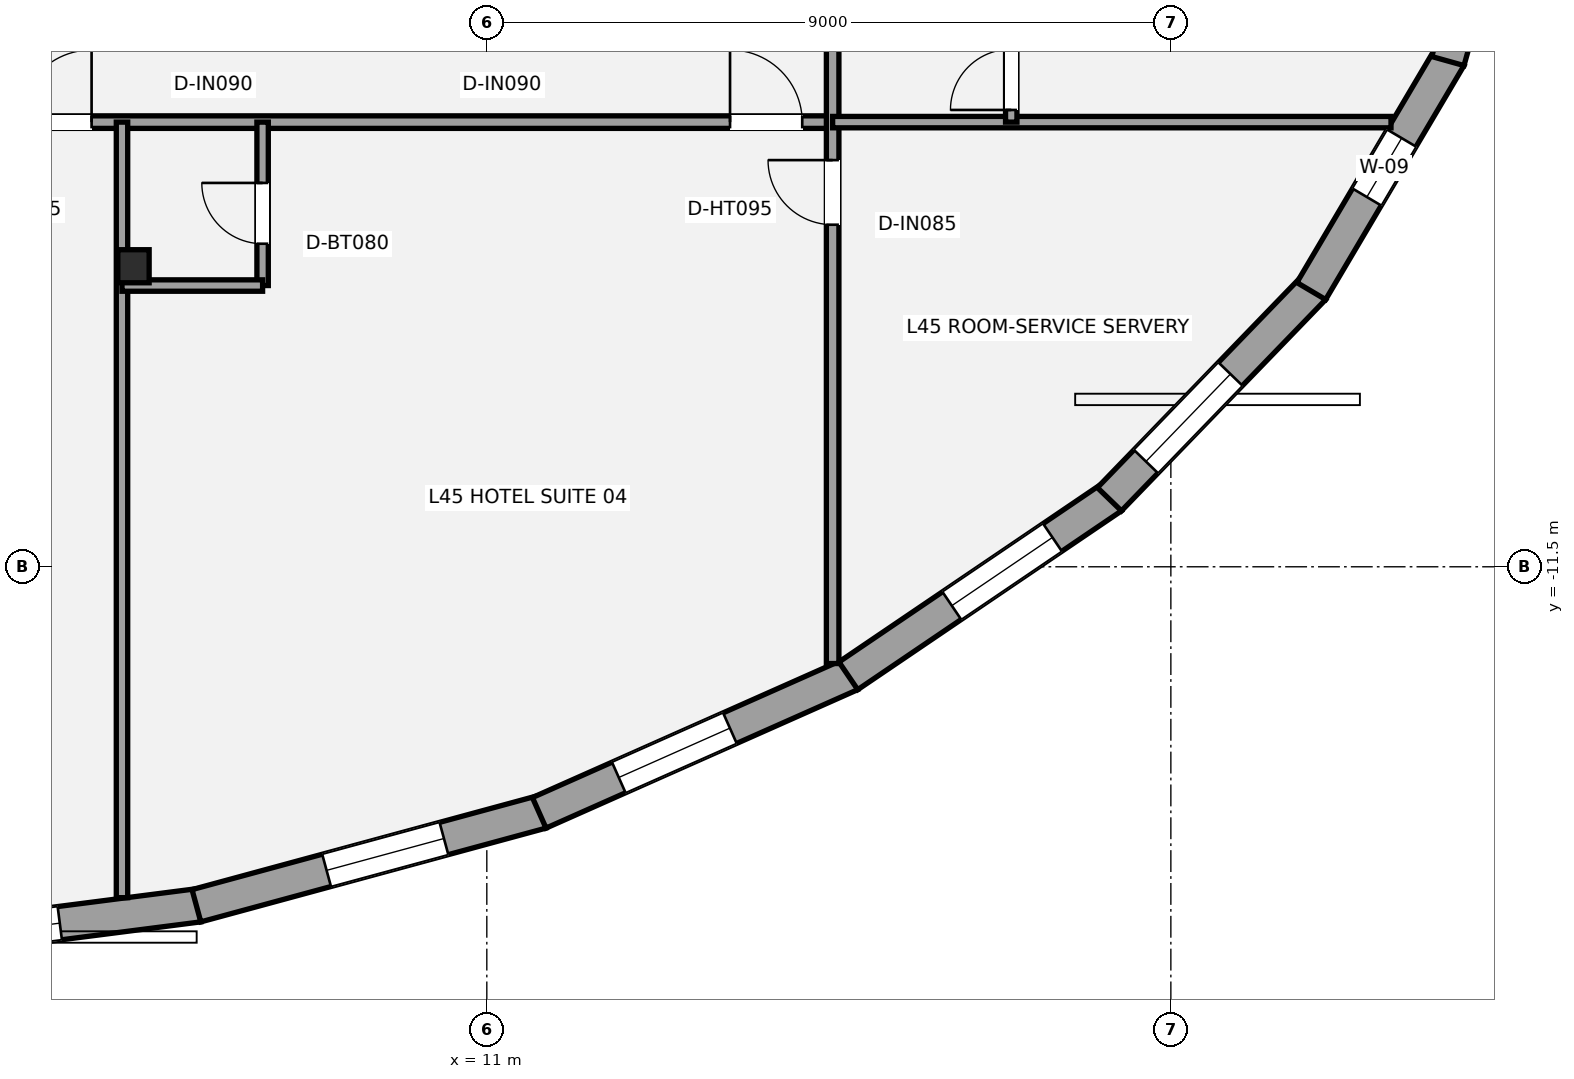
"""IFC4 building model, lengths in metres.
Left out: names, types, materials, properties, quantities, classifications, styles, units other than length and angle.
Written with IfcOpenShell. Run it as: python <this file> out.ifc"""

import sys

from ifc_helpers import new_model, si_unit, direction, frame, frame_2d, origin, origin_2d, place, context, subcontext, project, spatial, rectangle, i_section, extrude, element, fill, save


model = new_model("IFC4")
c1 = context("Model", 3, precision=1e-05, world=origin(), true_north=direction((0.0, 1.0)))
c2 = subcontext(c1, "Body", "Model", "MODEL_VIEW")
j1 = project(units=[si_unit("LENGTHUNIT", "METRE"), si_unit("PLANEANGLEUNIT", "RADIAN")], contexts=[c1])
p1 = place(None, origin())
s1 = spatial("IfcSite", under=j1, at=p1, CompositionType="ELEMENT")
p2 = place(p1, origin())
s2 = spatial("IfcBuilding", under=s1, at=p2, CompositionType="ELEMENT")
p3 = place(p2, frame((0.0, 0.0, 166.2)))
s3 = spatial("IfcBuildingStorey", under=s2, at=p3, CompositionType="ELEMENT", Elevation=166.2)
p4 = place(p3, frame((6.351, -7.546, 0.0), z_axis=(0.0, 0.0, 1.0), x_axis=(1.0, 0.0, 0.0)))
e1 = element("IfcColumn", 1, at=p4, inside=s3, PredefinedType="COLUMN", context=c2, shape_type="SweptSolid", body=[
    extrude(i_section(OverallWidth=0.412, OverallDepth=0.435, WebThickness=0.036, FlangeThickness=0.057, at=origin_2d()), origin(), (0.0, 0.0, 1.0), 3.2),
])
p5 = place(p3, frame((7.209, -15.954, 0.0), z_axis=(0.0, 0.0, 1.0), x_axis=(-0.991852910824, -0.127388395426, 0.0)))
e2 = element("IfcWall", 2, at=p5, inside=s3, PredefinedType="STANDARD", context=c2, shape_type="SweptSolid", body=[
    extrude(rectangle(XDim=4.837, YDim=0.44, at=frame_2d((2.418, 0.0))), origin(), (0.0, 0.0, 1.0), 2.315),
])
p6 = place(p5, frame((1.843, 0.0, 0.58)))
e3 = element("IfcOpeningElement", 3, at=p6, cuts=e2, PredefinedType="OPENING", context=c2, shape_type="SweptSolid", body=[
    extrude(rectangle(XDim=1.6, YDim=1.55, at=frame_2d((0.8, 0.775))), frame((0.0, 0.23, 0.0), z_axis=(0.0, -1.0, 0.0), x_axis=(1.0, 0.0, 0.0)), (0.0, 0.0, 1.0), 0.46),
])
p7 = place(p3, frame((11.721, -14.726, 0.0), z_axis=(0.0, 0.0, 1.0), x_axis=(-0.965037424263, -0.262112132058, 0.0)))
e4 = element("IfcWall", 4, at=p7, inside=s3, PredefinedType="STANDARD", context=c2, shape_type="SweptSolid", body=[
    extrude(rectangle(XDim=4.707, YDim=0.44, at=frame_2d((2.353, 0.0))), origin(), (0.0, 0.0, 1.0), 2.315),
])
p8 = place(p7, frame((1.332, 0.0, 0.58)))
e5 = element("IfcOpeningElement", 5, at=p8, cuts=e4, PredefinedType="OPENING", context=c2, shape_type="SweptSolid", body=[
    extrude(rectangle(XDim=1.6, YDim=1.55, at=frame_2d((0.8, 0.775))), frame((0.0, 0.23, 0.0), z_axis=(0.0, -1.0, 0.0), x_axis=(1.0, 0.0, 0.0)), (0.0, 0.0, 1.0), 0.46),
])
p9 = place(p3, frame((15.791, -12.916, 0.0), z_axis=(0.0, 0.0, 1.0), x_axis=(-0.913907994914, -0.405921392431, 0.0)))
e6 = element("IfcWall", 6, at=p9, inside=s3, PredefinedType="STANDARD", context=c2, shape_type="SweptSolid", body=[
    extrude(rectangle(XDim=4.487, YDim=0.44, at=frame_2d((2.244, 0.0))), origin(), (0.0, 0.0, 1.0), 2.315),
])
p10 = place(p9, frame((1.742, 0.0, 0.58)))
e7 = element("IfcOpeningElement", 7, at=p10, cuts=e6, PredefinedType="OPENING", context=c2, shape_type="SweptSolid", body=[
    extrude(rectangle(XDim=1.6, YDim=1.55, at=frame_2d((0.8, 0.775))), frame((0.0, 0.23, 0.0), z_axis=(0.0, -1.0, 0.0), x_axis=(1.0, 0.0, 0.0)), (0.0, 0.0, 1.0), 0.46),
])
p11 = place(p3, frame((19.227, -10.583, 0.0), z_axis=(0.0, 0.0, 1.0), x_axis=(-0.827760762475, -0.561081206338, 0.0)))
e8 = element("IfcWall", 8, at=p11, inside=s3, PredefinedType="STANDARD", context=c2, shape_type="SweptSolid", body=[
    extrude(rectangle(XDim=4.192, YDim=0.44, at=frame_2d((2.096, 0.0))), origin(), (0.0, 0.0, 1.0), 2.315),
])
p12 = place(p11, frame((0.947, 0.0, 0.58)))
e9 = element("IfcOpeningElement", 9, at=p12, cuts=e8, PredefinedType="OPENING", context=c2, shape_type="SweptSolid", body=[
    extrude(rectangle(XDim=1.6, YDim=1.55, at=frame_2d((0.8, 0.775))), frame((0.0, 0.23, 0.0), z_axis=(0.0, -1.0, 0.0), x_axis=(1.0, 0.0, 0.0)), (0.0, 0.0, 1.0), 0.46),
])
p13 = place(p3, frame((21.879, -7.832, 0.0), z_axis=(0.0, 0.0, 1.0), x_axis=(-0.694975307772, -0.719033602544, 0.0)))
e10 = element("IfcWall", 10, at=p13, inside=s3, PredefinedType="STANDARD", context=c2, shape_type="SweptSolid", body=[
    extrude(rectangle(XDim=3.866, YDim=0.44, at=frame_2d((1.933, 0.0))), origin(), (0.0, 0.0, 1.0), 2.315),
])
p14 = place(p13, frame((1.575, 0.0, 0.58)))
e11 = element("IfcOpeningElement", 11, at=p14, cuts=e10, PredefinedType="OPENING", context=c2, shape_type="SweptSolid", body=[
    extrude(rectangle(XDim=1.6, YDim=1.55, at=frame_2d((0.8, 0.775))), frame((0.0, 0.23, 0.0), z_axis=(0.0, -1.0, 0.0), x_axis=(1.0, 0.0, 0.0)), (0.0, 0.0, 1.0), 0.46),
])
p15 = place(p3, frame((23.667, -4.794, 0.0), z_axis=(0.0, 0.0, 1.0), x_axis=(-0.508883387051, -0.860835465338, 0.0)))
e12 = element("IfcWall", 12, at=p15, inside=s3, PredefinedType="STANDARD", context=c2, shape_type="SweptSolid", body=[
    extrude(rectangle(XDim=3.577, YDim=0.44, at=frame_2d((1.788, 0.0))), origin(), (0.0, 0.0, 1.0), 2.315),
])
p16 = place(p15, frame((1.239, 0.0, 0.58)))
e13 = element("IfcOpeningElement", 13, at=p16, cuts=e12, PredefinedType="OPENING", context=c2, shape_type="SweptSolid", body=[
    extrude(rectangle(XDim=0.9, YDim=1.35, at=frame_2d((0.45, 0.675))), frame((0.0, 0.23, 0.0), z_axis=(0.0, -1.0, 0.0), x_axis=(1.0, 0.0, 0.0)), (0.0, 0.0, 1.0), 0.46),
])
p17 = place(p3, frame((24.554, -1.594, 0.0), z_axis=(0.0, 0.0, 1.0), x_axis=(-0.269235699479, -0.963074315993, 0.0)))
e14 = element("IfcWall", 14, at=p17, inside=s3, PredefinedType="STANDARD", context=c2, shape_type="SweptSolid", body=[
    extrude(rectangle(XDim=3.377, YDim=0.44, at=frame_2d((1.688, 0.0))), origin(), (0.0, 0.0, 1.0), 2.315),
])
p18 = place(p17, frame((1.429, 0.0, 0.58)))
e15 = element("IfcOpeningElement", 15, at=p18, cuts=e14, PredefinedType="OPENING", context=c2, shape_type="SweptSolid", body=[
    extrude(rectangle(XDim=1.6, YDim=1.55, at=frame_2d((0.8, 0.775))), frame((0.0, 0.23, 0.0), z_axis=(0.0, -1.0, 0.0), x_axis=(1.0, 0.0, 0.0)), (0.0, 0.0, 1.0), 0.46),
])
p19 = place(p3, frame((-15.95, -5.65, 0.0), z_axis=(0.0, 0.0, 1.0), x_axis=(1.0, 0.0, 0.0)))
e16 = element("IfcWall", 16, at=p19, inside=s3, PredefinedType="PARTITIONING", context=c2, shape_type="SweptSolid", body=[
    extrude(rectangle(XDim=31.5, YDim=0.165, at=frame_2d((15.75, 0.0))), origin(), (0.0, 0.0, 1.0), 2.398),
])
p20 = place(p19, frame((4.8, 0.0, 0.0)))
e17 = element("IfcOpeningElement", 17, at=p20, cuts=e16, PredefinedType="OPENING", context=c2, shape_type="SweptSolid", body=[
    extrude(rectangle(XDim=0.95, YDim=2.15, at=frame_2d((0.475, 1.075))), frame((0.0, 0.093, 0.0), z_axis=(0.0, -1.0, 0.0), x_axis=(1.0, 0.0, 0.0)), (0.0, 0.0, 1.0), 0.185),
])
p21 = place(p19, frame((12.8, 0.0, 0.0)))
e18 = element("IfcOpeningElement", 18, at=p21, cuts=e16, PredefinedType="OPENING", context=c2, shape_type="SweptSolid", body=[
    extrude(rectangle(XDim=0.95, YDim=2.15, at=frame_2d((0.475, 1.075))), frame((0.0, 0.093, 0.0), z_axis=(0.0, -1.0, 0.0), x_axis=(1.0, 0.0, 0.0)), (0.0, 0.0, 1.0), 0.185),
])
p22 = place(p19, frame((20.8, 0.0, 0.0)))
e19 = element("IfcOpeningElement", 19, at=p22, cuts=e16, PredefinedType="OPENING", context=c2, shape_type="SweptSolid", body=[
    extrude(rectangle(XDim=0.95, YDim=2.15, at=frame_2d((0.475, 1.075))), frame((0.0, 0.093, 0.0), z_axis=(0.0, -1.0, 0.0), x_axis=(1.0, 0.0, 0.0)), (0.0, 0.0, 1.0), 0.185),
])
p23 = place(p19, frame((30.15, 0.0, 0.0)))
e20 = element("IfcOpeningElement", 20, at=p23, cuts=e16, PredefinedType="OPENING", context=c2, shape_type="SweptSolid", body=[
    extrude(rectangle(XDim=0.95, YDim=2.15, at=frame_2d((0.475, 1.075))), frame((0.0, 0.093, 0.0), z_axis=(0.0, -1.0, 0.0), x_axis=(1.0, 0.0, 0.0)), (0.0, 0.0, 1.0), 0.185),
])
p24 = place(p3, frame((15.55, -12.773, 0.0), z_axis=(0.0, 0.0, 1.0), x_axis=(0.0, 1.0, 0.0)))
e21 = element("IfcWall", 21, at=p24, inside=s3, PredefinedType="PARTITIONING", context=c2, shape_type="SweptSolid", body=[
    extrude(rectangle(XDim=20.323, YDim=0.165, at=frame_2d((10.162, 0.0))), origin(), (0.0, 0.0, 1.0), 2.473),
])
p25 = place(p24, frame((5.773, 0.0, 0.0)))
e22 = element("IfcOpeningElement", 22, at=p25, cuts=e21, PredefinedType="OPENING", context=c2, shape_type="SweptSolid", body=[
    extrude(rectangle(XDim=0.85, YDim=2.1, at=frame_2d((0.425, 1.05))), frame((0.0, 0.093, 0.0), z_axis=(0.0, -1.0, 0.0), x_axis=(1.0, 0.0, 0.0)), (0.0, 0.0, 1.0), 0.185),
])
p26 = place(p24, frame((9.823, 0.0, 0.0)))
e23 = element("IfcOpeningElement", 23, at=p26, cuts=e21, PredefinedType="OPENING", context=c2, shape_type="SweptSolid", body=[
    extrude(rectangle(XDim=0.95, YDim=2.15, at=frame_2d((0.475, 1.075))), frame((0.0, 0.093, 0.0), z_axis=(0.0, -1.0, 0.0), x_axis=(1.0, 0.0, 0.0)), (0.0, 0.0, 1.0), 0.185),
])
p27 = place(p24, frame((14.223, 0.0, 0.0)))
e24 = element("IfcOpeningElement", 24, at=p27, cuts=e21, PredefinedType="OPENING", context=c2, shape_type="SweptSolid", body=[
    extrude(rectangle(XDim=0.95, YDim=2.15, at=frame_2d((0.475, 1.075))), frame((0.0, 0.093, 0.0), z_axis=(0.0, -1.0, 0.0), x_axis=(1.0, 0.0, 0.0)), (0.0, 0.0, 1.0), 0.185),
])
p28 = place(p24, frame((18.973, 0.0, 0.0)))
e25 = element("IfcOpeningElement", 25, at=p28, cuts=e21, PredefinedType="OPENING", context=c2, shape_type="SweptSolid", body=[
    extrude(rectangle(XDim=0.95, YDim=2.15, at=frame_2d((0.475, 1.075))), frame((0.0, 0.093, 0.0), z_axis=(0.0, -1.0, 0.0), x_axis=(1.0, 0.0, 0.0)), (0.0, 0.0, 1.0), 0.185),
])
p29 = place(p3, frame((15.55, -5.65, 0.0), z_axis=(0.0, 0.0, 1.0), x_axis=(1.0, 0.0, 0.0)))
e26 = element("IfcWall", 26, at=p29, inside=s3, PredefinedType="PLUMBINGWALL", context=c2, shape_type="SweptSolid", body=[
    extrude(rectangle(XDim=7.346, YDim=0.15, at=frame_2d((3.673, 0.0))), origin(), (0.0, 0.0, 1.0), 2.473),
])
p30 = place(p3, frame((6.2, -15.853, 0.0), z_axis=(0.0, 0.0, 1.0), x_axis=(0.0, 1.0, 0.0)))
e27 = element("IfcWall", 27, at=p30, inside=s3, PredefinedType="PLUMBINGWALL", context=c2, shape_type="SweptSolid", body=[
    extrude(rectangle(XDim=10.203, YDim=0.15, at=frame_2d((5.102, 0.0))), origin(), (0.0, 0.0, 1.0), 2.473),
])
p31 = place(p3, frame((8.05, -7.8, 0.0), z_axis=(0.0, 0.0, 1.0), x_axis=(0.0, 1.0, 0.0)))
e28 = element("IfcWall", 28, at=p31, inside=s3, PredefinedType="PLUMBINGWALL", context=c2, shape_type="SweptSolid", body=[
    extrude(rectangle(XDim=2.15, YDim=0.15, at=frame_2d((1.075, 0.0))), origin(), (0.0, 0.0, 1.0), 2.473),
])
p32 = place(p31, frame((0.55, 0.0, 0.0)))
e29 = element("IfcOpeningElement", 29, at=p32, cuts=e28, PredefinedType="OPENING", context=c2, shape_type="SweptSolid", body=[
    extrude(rectangle(XDim=0.8, YDim=2.1, at=frame_2d((0.4, 1.05))), frame((0.0, 0.085, 0.0), z_axis=(0.0, -1.0, 0.0), x_axis=(1.0, 0.0, 0.0)), (0.0, 0.0, 1.0), 0.17),
])
p33 = place(p3, frame((6.2, -7.8, 0.0), z_axis=(0.0, 0.0, 1.0), x_axis=(1.0, 0.0, 0.0)))
e30 = element("IfcWall", 30, at=p33, inside=s3, PredefinedType="PLUMBINGWALL", context=c2, shape_type="SweptSolid", body=[
    extrude(rectangle(XDim=1.85, YDim=0.15, at=frame_2d((0.925, 0.0))), origin(), (0.0, 0.0, 1.0), 2.473),
])
p34 = place(p3, frame((17.9, -5.65, 0.0), z_axis=(0.0, 0.0, 1.0), x_axis=(0.0, 1.0, 0.0)))
e31 = element("IfcWall", 31, at=p34, inside=s3, PredefinedType="PLUMBINGWALL", context=c2, shape_type="SweptSolid", body=[
    extrude(rectangle(XDim=2.15, YDim=0.15, at=frame_2d((1.075, 0.0))), origin(), (0.0, 0.0, 1.0), 3.02),
])
p35 = place(p34, frame((0.16, 0.0, 0.0)))
e32 = element("IfcOpeningElement", 32, at=p35, cuts=e31, PredefinedType="OPENING", context=c2, shape_type="SweptSolid", body=[
    extrude(rectangle(XDim=0.8, YDim=2.1, at=frame_2d((0.4, 1.05))), frame((0.0, 0.085, 0.0), z_axis=(0.0, -1.0, 0.0), x_axis=(1.0, 0.0, 0.0)), (0.0, 0.0, 1.0), 0.17),
])
p36 = place(p6, origin())
e33 = element("IfcWindow", 33, at=p36, inside=s3, PartitioningType="SINGLE_PANEL", PredefinedType="WINDOW", context=c2, shape_type="SweptSolid", body=[
    extrude(rectangle(XDim=1.6, YDim=1.55, at=frame_2d((0.8, 0.775))), frame((0.0, -0.01, 0.0), z_axis=(0.0, -1.0, 0.0), x_axis=(1.0, 0.0, 0.0)), (0.0, 0.0, 1.0), 0.06),
])
fill(e3, e33)
p37 = place(p8, origin())
e34 = element("IfcWindow", 34, at=p37, inside=s3, PartitioningType="SINGLE_PANEL", PredefinedType="WINDOW", context=c2, shape_type="SweptSolid", body=[
    extrude(rectangle(XDim=1.6, YDim=1.55, at=frame_2d((0.8, 0.775))), frame((0.0, -0.01, 0.0), z_axis=(0.0, -1.0, 0.0), x_axis=(1.0, 0.0, 0.0)), (0.0, 0.0, 1.0), 0.06),
])
fill(e5, e34)
p38 = place(p10, origin())
e35 = element("IfcWindow", 35, at=p38, inside=s3, PartitioningType="SINGLE_PANEL", PredefinedType="WINDOW", context=c2, shape_type="SweptSolid", body=[
    extrude(rectangle(XDim=1.6, YDim=1.55, at=frame_2d((0.8, 0.775))), frame((0.0, -0.01, 0.0), z_axis=(0.0, -1.0, 0.0), x_axis=(1.0, 0.0, 0.0)), (0.0, 0.0, 1.0), 0.06),
])
fill(e7, e35)
p39 = place(p12, origin())
e36 = element("IfcWindow", 36, at=p39, inside=s3, PartitioningType="SINGLE_PANEL", PredefinedType="WINDOW", context=c2, shape_type="SweptSolid", body=[
    extrude(rectangle(XDim=1.6, YDim=1.55, at=frame_2d((0.8, 0.775))), frame((0.0, -0.01, 0.0), z_axis=(0.0, -1.0, 0.0), x_axis=(1.0, 0.0, 0.0)), (0.0, 0.0, 1.0), 0.06),
])
fill(e9, e36)
p40 = place(p14, origin())
e37 = element("IfcWindow", 37, at=p40, inside=s3, PartitioningType="SINGLE_PANEL", PredefinedType="WINDOW", context=c2, shape_type="SweptSolid", body=[
    extrude(rectangle(XDim=1.6, YDim=1.55, at=frame_2d((0.8, 0.775))), frame((0.0, -0.01, 0.0), z_axis=(0.0, -1.0, 0.0), x_axis=(1.0, 0.0, 0.0)), (0.0, 0.0, 1.0), 0.06),
])
fill(e11, e37)
p41 = place(p16, origin())
e38 = element("IfcWindow", 38, at=p41, inside=s3, PartitioningType="SINGLE_PANEL", PredefinedType="WINDOW", context=c2, shape_type="SweptSolid", body=[
    extrude(rectangle(XDim=0.9, YDim=1.35, at=frame_2d((0.45, 0.675))), frame((0.0, -0.01, 0.0), z_axis=(0.0, -1.0, 0.0), x_axis=(1.0, 0.0, 0.0)), (0.0, 0.0, 1.0), 0.06),
])
fill(e13, e38)
p42 = place(p25, origin())
e39 = element("IfcDoor", 39, at=p42, inside=s3, OperationType="SINGLE_SWING_RIGHT", PredefinedType="DOOR", context=c2, shape_type="SweptSolid", body=[
    extrude(rectangle(XDim=0.85, YDim=2.1, at=frame_2d((0.425, 1.05))), frame((0.0, 0.025, 0.0), z_axis=(0.0, -1.0, 0.0), x_axis=(1.0, 0.0, 0.0)), (0.0, 0.0, 1.0), 0.05),
])
fill(e22, e39)
p43 = place(p22, origin())
e40 = element("IfcDoor", 40, at=p43, inside=s3, OperationType="SINGLE_SWING_RIGHT", PredefinedType="DOOR", context=c2, shape_type="SweptSolid", body=[
    extrude(rectangle(XDim=0.95, YDim=2.15, at=frame_2d((0.475, 1.075))), frame((0.0, 0.025, 0.0), z_axis=(0.0, -1.0, 0.0), x_axis=(1.0, 0.0, 0.0)), (0.0, 0.0, 1.0), 0.05),
])
fill(e19, e40)
p44 = place(p23, origin())
e41 = element("IfcDoor", 41, at=p44, inside=s3, OperationType="SINGLE_SWING_LEFT", PredefinedType="DOOR", context=c2, shape_type="SweptSolid", body=[
    extrude(rectangle(XDim=0.95, YDim=2.15, at=frame_2d((0.475, 1.075))), frame((0.0, 0.025, 0.0), z_axis=(0.0, -1.0, 0.0), x_axis=(1.0, 0.0, 0.0)), (0.0, 0.0, 1.0), 0.05),
])
fill(e20, e41)
p45 = place(p32, origin())
e42 = element("IfcDoor", 42, at=p45, inside=s3, OperationType="SINGLE_SWING_RIGHT", PredefinedType="DOOR", context=c2, shape_type="SweptSolid", body=[
    extrude(rectangle(XDim=0.8, YDim=2.1, at=frame_2d((0.4, 1.05))), frame((0.0, 0.025, 0.0), z_axis=(0.0, -1.0, 0.0), x_axis=(1.0, 0.0, 0.0)), (0.0, 0.0, 1.0), 0.05),
])
fill(e29, e42)
p46 = place(p35, origin())
e43 = element("IfcDoor", 43, at=p46, inside=s3, OperationType="SINGLE_SWING_LEFT", PredefinedType="DOOR", context=c2, shape_type="SweptSolid", body=[
    extrude(rectangle(XDim=0.8, YDim=2.1, at=frame_2d((0.4, 1.05))), frame((0.0, 0.025, 0.0), z_axis=(0.0, -1.0, 0.0), x_axis=(1.0, 0.0, 0.0)), (0.0, 0.0, 1.0), 0.05),
])
fill(e32, e43)
save(model, sys.argv[1])
